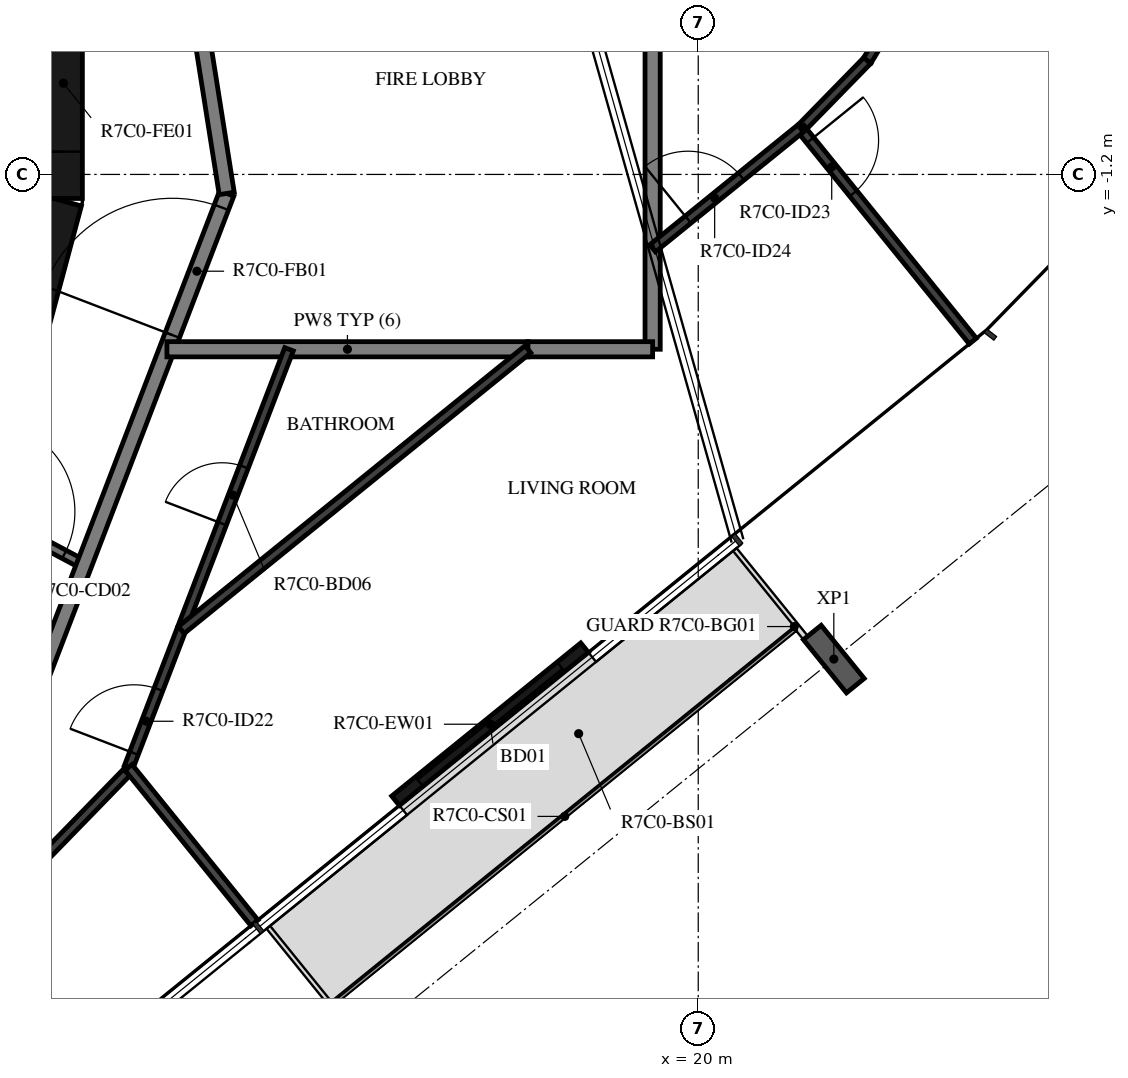
"""IFC4 building model, lengths in metres.
Left out: names, types, materials, properties, quantities, classifications, styles, units other than length and angle.
Written with IfcOpenShell. Run it as: python <this file> out.ifc"""

import sys

from ifc_helpers import new_model, si_unit, direction, frame, frame_2d, origin, origin_2d, place, context, subcontext, project, spatial, rectangle, i_section, extrude, element, fill, save


model = new_model("IFC4")
c1 = context("Model", 3, precision=1e-05, world=origin(), true_north=direction((0.0, 1.0)))
c2 = subcontext(c1, "Body", "Model", "MODEL_VIEW")
j1 = project(units=[si_unit("LENGTHUNIT", "METRE"), si_unit("PLANEANGLEUNIT", "RADIAN")], contexts=[c1])
p1 = place(None, origin())
s1 = spatial("IfcSite", under=j1, at=p1, CompositionType="ELEMENT")
p2 = place(p1, origin())
s2 = spatial("IfcBuilding", under=s1, at=p2, CompositionType="ELEMENT")
p3 = place(p2, frame((0.0, 0.0, 284.4)))
s3 = spatial("IfcBuildingStorey", under=s2, at=p3, CompositionType="ELEMENT", Elevation=284.4)
p4 = place(p3, frame((21.784, -7.576, -0.38), z_axis=(0.0, 0.0, 1.0), x_axis=(-0.777146167973, -0.629320136024, 0.0)))
e1 = element("IfcColumn", 1, at=p4, inside=s3, PredefinedType="COLUMN", context=c2, shape_type="SweptSolid", body=[
    extrude(i_section(OverallWidth=0.3, OverallDepth=0.9, WebThickness=0.019, FlangeThickness=0.035, FilletRadius=0.03, at=origin_2d()), origin(), (0.0, 0.0, 1.0), 3.5),
])
p5 = place(p3, frame((16.018, -9.44, 0.0), z_axis=(0.0, 0.0, 1.0), x_axis=(0.777125818, 0.629345265333, 0.0)))
e2 = element("IfcWall", 2, at=p5, inside=s3, PredefinedType="STANDARD", context=c2, shape_type="SweptSolid", body=[
    extrude(rectangle(XDim=3.2, YDim=0.16, at=frame_2d((1.6, 0.0))), origin(), (0.0, 0.0, 1.0), 3.12),
])
p6 = place(p5, frame((0.4, 0.0, 0.0)))
e3 = element("IfcOpeningElement", 3, at=p6, cuts=e2, PredefinedType="OPENING", context=c2, shape_type="SweptSolid", body=[
    extrude(rectangle(XDim=2.4, YDim=2.4, at=frame_2d((1.2, 1.2))), frame((0.0, 0.09, 0.0), z_axis=(0.0, -1.0, 0.0), x_axis=(1.0, 0.0, 0.0)), (0.0, 0.0, 1.0), 0.18),
])
p7 = place(p3, frame((10.858, -4.479, 0.0), z_axis=(0.0, 0.0, 1.0), x_axis=(0.258734743916, 0.965948410781, 0.0)))
e4 = element("IfcWall", 4, at=p7, inside=s3, PredefinedType="SHEAR", context=c2, shape_type="SweptSolid", body=[
    extrude(rectangle(XDim=3.033, YDim=0.5, at=frame_2d((1.516, 0.0))), origin(), (0.0, 0.0, 1.0), 3.12),
])
p8 = place(p3, frame((11.647, -1.516, 0.0), z_axis=(0.0, 0.0, 1.0), x_axis=(0.0, 1.0, 0.0)))
e5 = element("IfcWall", 5, at=p8, inside=s3, PredefinedType="SHEAR", context=c2, shape_type="SweptSolid", body=[
    extrude(rectangle(XDim=3.033, YDim=0.5, at=frame_2d((1.516, 0.0))), origin(), (0.0, 0.0, 1.0), 3.12),
])
p9 = place(p8, frame((0.616, 0.0, 0.0)))
e6 = element("IfcOpeningElement", 6, at=p9, cuts=e5, PredefinedType="OPENING", context=c2, shape_type="SweptSolid", body=[
    extrude(rectangle(XDim=1.8, YDim=2.1, at=frame_2d((0.9, 1.05))), frame((0.0, 0.26, 0.0), z_axis=(0.0, -1.0, 0.0), x_axis=(1.0, 0.0, 0.0)), (0.0, 0.0, 1.0), 0.52),
])
p10 = place(p3, frame((10.511, -5.589, 0.0), z_axis=(0.0, 0.0, 1.0), x_axis=(0.882983002821, -0.469404960273, 0.0)))
e7 = element("IfcWall", 7, at=p10, inside=s3, PredefinedType="PARTITIONING", context=c2, shape_type="SweptSolid", body=[
    extrude(rectangle(XDim=1.596, YDim=0.12, at=frame_2d((0.798, 0.0))), origin(), (0.0, 0.0, 1.0), 3.12),
])
p11 = place(p10, frame((0.1, 0.0, 0.0)))
e8 = element("IfcOpeningElement", 8, at=p11, cuts=e7, PredefinedType="OPENING", context=c2, shape_type="SweptSolid", body=[
    extrude(rectangle(XDim=1.2, YDim=2.1, at=frame_2d((0.6, 1.05))), frame((0.0, 0.07, 0.0), z_axis=(0.0, -1.0, 0.0), x_axis=(1.0, 0.0, 0.0)), (0.0, 0.0, 1.0), 0.14),
])
p12 = place(p3, frame((11.223, -8.154, 0.0), z_axis=(0.0, 0.0, 1.0), x_axis=(0.358341090983, 0.93359073609, 0.0)))
e9 = element("IfcWall", 9, at=p12, inside=s3, PredefinedType="STANDARD", context=c2, shape_type="SweptSolid", body=[
    extrude(rectangle(XDim=7.181, YDim=0.2, at=frame_2d((3.59, 0.0))), origin(), (0.0, 0.0, 1.0), 3.12),
])
p13 = place(p12, frame((5.185, 0.0, 0.0)))
e10 = element("IfcOpeningElement", 10, at=p13, cuts=e9, PredefinedType="OPENING", context=c2, shape_type="SweptSolid", body=[
    extrude(rectangle(XDim=1.8, YDim=2.1, at=frame_2d((0.9, 1.05))), frame((0.0, 0.11, 0.0), z_axis=(0.0, -1.0, 0.0), x_axis=(1.0, 0.0, 0.0)), (0.0, 0.0, 1.0), 0.22),
])
p14 = place(p3, frame((13.797, -1.45, 0.0), z_axis=(0.0, 0.0, 1.0), x_axis=(-0.156421704315, 0.987690361611, 0.0)))
e11 = element("IfcWall", 11, at=p14, inside=s3, PredefinedType="STANDARD", context=c2, shape_type="SweptSolid", body=[
    extrude(rectangle(XDim=7.181, YDim=0.2, at=frame_2d((3.591, 0.0))), origin(), (0.0, 0.0, 1.0), 3.12),
])
p15 = place(p3, frame((13.01, -3.5, 0.0), z_axis=(0.0, 0.0, 1.0), x_axis=(1.0, 0.0, 0.0)))
e12 = element("IfcWall", 12, at=p15, inside=s3, PredefinedType="STANDARD", context=c2, shape_type="SweptSolid", body=[
    extrude(rectangle(XDim=4.75, YDim=0.2, at=frame_2d((2.375, 0.0))), origin(), (0.0, 0.0, 1.0), 3.12),
])
p16 = place(p3, frame((19.4, -3.5, 0.0), z_axis=(0.0, 0.0, 1.0), x_axis=(0.0, 1.0, 0.0)))
e13 = element("IfcWall", 13, at=p16, inside=s3, PredefinedType="STANDARD", context=c2, shape_type="SweptSolid", body=[
    extrude(rectangle(XDim=5.021, YDim=0.2, at=frame_2d((2.511, 0.0))), origin(), (0.0, 0.0, 1.0), 3.12),
])
p17 = place(p3, frame((17.76, -3.5, 0.0), z_axis=(0.0, 0.0, 1.0), x_axis=(1.0, 0.0, 0.0)))
e14 = element("IfcWall", 14, at=p17, inside=s3, PredefinedType="STANDARD", context=c2, shape_type="SweptSolid", body=[
    extrude(rectangle(XDim=1.64, YDim=0.2, at=frame_2d((0.82, 0.0))), origin(), (0.0, 0.0, 1.0), 3.12),
])
p18 = place(p3, frame((7.007, -14.692, 0.0), z_axis=(0.0, 0.0, 1.0), x_axis=(0.697286714348, 0.716792325568, 0.0)))
e15 = element("IfcWall", 15, at=p18, inside=s3, PredefinedType="PARTITIONING", context=c2, shape_type="SweptSolid", body=[
    extrude(rectangle(XDim=7.848, YDim=0.12, at=frame_2d((3.924, 0.0))), origin(), (0.0, 0.0, 1.0), 3.12),
])
p19 = place(p18, frame((0.2, 0.0, 0.0)))
e16 = element("IfcOpeningElement", 16, at=p19, cuts=e15, PredefinedType="OPENING", context=c2, shape_type="SweptSolid", body=[
    extrude(rectangle(XDim=0.9, YDim=2.1, at=frame_2d((0.45, 1.05))), frame((0.0, 0.07, 0.0), z_axis=(0.0, -1.0, 0.0), x_axis=(1.0, 0.0, 0.0)), (0.0, 0.0, 1.0), 0.14),
])
p20 = place(p3, frame((12.505, -9.001, 0.0), z_axis=(0.0, 0.0, 1.0), x_axis=(0.358373707046, 0.933578216379, 0.0)))
e17 = element("IfcWall", 17, at=p20, inside=s3, PredefinedType="PARTITIONING", context=c2, shape_type="SweptSolid", body=[
    extrude(rectangle(XDim=5.892, YDim=0.12, at=frame_2d((2.946, 0.0))), origin(), (0.0, 0.0, 1.0), 3.12),
])
p21 = place(p20, frame((0.2, 0.0, 0.0)))
e18 = element("IfcOpeningElement", 18, at=p21, cuts=e17, PredefinedType="OPENING", context=c2, shape_type="SweptSolid", body=[
    extrude(rectangle(XDim=0.9, YDim=2.1, at=frame_2d((0.45, 1.05))), frame((0.0, 0.07, 0.0), z_axis=(0.0, -1.0, 0.0), x_axis=(1.0, 0.0, 0.0)), (0.0, 0.0, 1.0), 0.14),
])
p22 = place(p20, frame((3.436, 0.0, 0.0)))
e19 = element("IfcOpeningElement", 19, at=p22, cuts=e17, PredefinedType="OPENING", context=c2, shape_type="SweptSolid", body=[
    extrude(rectangle(XDim=0.8, YDim=2.1, at=frame_2d((0.4, 1.05))), frame((0.0, 0.07, 0.0), z_axis=(0.0, -1.0, 0.0), x_axis=(1.0, 0.0, 0.0)), (0.0, 0.0, 1.0), 0.14),
])
p23 = place(p3, frame((22.746, 1.168, 0.0), z_axis=(0.0, 0.0, 1.0), x_axis=(-0.515096534995, -0.857132171626, 0.0)))
e20 = element("IfcWall", 20, at=p23, inside=s3, PredefinedType="PARTITIONING", context=c2, shape_type="SweptSolid", body=[
    extrude(rectangle(XDim=1.016, YDim=0.12, at=frame_2d((0.508, 0.0))), origin(), (0.0, 0.0, 1.0), 3.12),
])
p24 = place(p3, frame((22.223, 0.298, 0.0), z_axis=(0.0, 0.0, 1.0), x_axis=(-0.69880109182, -0.715316037896, 0.0)))
e21 = element("IfcWall", 21, at=p24, inside=s3, PredefinedType="PARTITIONING", context=c2, shape_type="SweptSolid", body=[
    extrude(rectangle(XDim=1.227, YDim=0.12, at=frame_2d((0.614, 0.0))), origin(), (0.0, 0.0, 1.0), 3.12),
])
p25 = place(p3, frame((21.347, -0.595, 0.0), z_axis=(0.0, 0.0, 1.0), x_axis=(0.62934843781, -0.7771232488, 0.0)))
e22 = element("IfcWall", 22, at=p25, inside=s3, PredefinedType="PARTITIONING", context=c2, shape_type="SweptSolid", body=[
    extrude(rectangle(XDim=3.6, YDim=0.12, at=frame_2d((1.8, 0.0))), origin(), (0.0, 0.0, 1.0), 3.12),
])
p26 = place(p25, frame((0.2, 0.0, 0.0)))
e23 = element("IfcOpeningElement", 23, at=p26, cuts=e22, PredefinedType="OPENING", context=c2, shape_type="SweptSolid", body=[
    extrude(rectangle(XDim=0.9, YDim=2.1, at=frame_2d((0.45, 1.05))), frame((0.0, 0.07, 0.0), z_axis=(0.0, -1.0, 0.0), x_axis=(1.0, 0.0, 0.0)), (0.0, 0.0, 1.0), 0.14),
])
p27 = place(p3, frame((19.4, -2.172, 0.0), z_axis=(0.0, 0.0, 1.0), x_axis=(0.777147279935, 0.629318762862, 0.0)))
e24 = element("IfcWall", 24, at=p27, inside=s3, PredefinedType="PARTITIONING", context=c2, shape_type="SweptSolid", body=[
    extrude(rectangle(XDim=2.505, YDim=0.12, at=frame_2d((1.253, 0.0))), origin(), (0.0, 0.0, 1.0), 3.12),
])
p28 = place(p27, frame((0.6, 0.0, 0.0)))
e25 = element("IfcOpeningElement", 25, at=p28, cuts=e24, PredefinedType="OPENING", context=c2, shape_type="SweptSolid", body=[
    extrude(rectangle(XDim=0.9, YDim=2.1, at=frame_2d((0.45, 1.05))), frame((0.0, 0.07, 0.0), z_axis=(0.0, -1.0, 0.0), x_axis=(1.0, 0.0, 0.0)), (0.0, 0.0, 1.0), 0.14),
])
p29 = place(p3, frame((14.161, -11.046, 0.0), z_axis=(0.0, 0.0, 1.0), x_axis=(-0.62931028473, 0.777154145284, 0.0)))
e26 = element("IfcWall", 26, at=p29, inside=s3, PredefinedType="PARTITIONING", context=c2, shape_type="SweptSolid", body=[
    extrude(rectangle(XDim=2.632, YDim=0.12, at=frame_2d((1.316, 0.0))), origin(), (0.0, 0.0, 1.0), 2.73),
])
p30 = place(p3, frame((17.76, -3.5, 0.0), z_axis=(0.0, 0.0, 1.0), x_axis=(-0.777133455716, -0.62933583404, 0.0)))
e27 = element("IfcWall", 27, at=p30, inside=s3, PredefinedType="PARTITIONING", context=c2, shape_type="SweptSolid", body=[
    extrude(rectangle(XDim=5.869, YDim=0.12, at=frame_2d((2.935, 0.0))), origin(), (0.0, 0.0, 1.0), 3.12),
])
p31 = place(p6, origin())
e28 = element("IfcDoor", 28, at=p31, inside=s3, OperationType="DOUBLE_DOOR_SLIDING", PredefinedType="DOOR", context=c2, shape_type="SweptSolid", body=[
    extrude(rectangle(XDim=2.4, YDim=2.4, at=frame_2d((1.2, 1.2))), frame((0.0, 0.025, 0.0), z_axis=(0.0, -1.0, 0.0), x_axis=(1.0, 0.0, 0.0)), (0.0, 0.0, 1.0), 0.05),
])
fill(e3, e28)
p32 = place(p9, origin())
e29 = element("IfcDoor", 29, at=p32, inside=s3, OperationType="DOUBLE_DOOR_SINGLE_SWING", PredefinedType="DOOR", context=c2, shape_type="SweptSolid", body=[
    extrude(rectangle(XDim=1.8, YDim=2.1, at=frame_2d((0.9, 1.05))), frame((0.0, 0.025, 0.0), z_axis=(0.0, -1.0, 0.0), x_axis=(1.0, 0.0, 0.0)), (0.0, 0.0, 1.0), 0.05),
])
fill(e6, e29)
p33 = place(p21, origin())
e30 = element("IfcDoor", 30, at=p33, inside=s3, OperationType="SINGLE_SWING_RIGHT", PredefinedType="DOOR", context=c2, shape_type="SweptSolid", body=[
    extrude(rectangle(XDim=0.9, YDim=2.1, at=frame_2d((0.45, 1.05))), frame((0.0, 0.025, 0.0), z_axis=(0.0, -1.0, 0.0), x_axis=(1.0, 0.0, 0.0)), (0.0, 0.0, 1.0), 0.05),
])
fill(e18, e30)
p34 = place(p22, origin())
e31 = element("IfcDoor", 31, at=p34, inside=s3, OperationType="SINGLE_SWING_RIGHT", PredefinedType="DOOR", context=c2, shape_type="SweptSolid", body=[
    extrude(rectangle(XDim=0.8, YDim=2.1, at=frame_2d((0.4, 1.05))), frame((0.0, 0.025, 0.0), z_axis=(0.0, -1.0, 0.0), x_axis=(1.0, 0.0, 0.0)), (0.0, 0.0, 1.0), 0.05),
])
fill(e19, e31)
p35 = place(p26, origin())
e32 = element("IfcDoor", 32, at=p35, inside=s3, OperationType="SINGLE_SWING_RIGHT", PredefinedType="DOOR", context=c2, shape_type="SweptSolid", body=[
    extrude(rectangle(XDim=0.9, YDim=2.1, at=frame_2d((0.45, 1.05))), frame((0.0, 0.025, 0.0), z_axis=(0.0, -1.0, 0.0), x_axis=(1.0, 0.0, 0.0)), (0.0, 0.0, 1.0), 0.05),
])
fill(e23, e32)
p36 = place(p28, origin())
e33 = element("IfcDoor", 33, at=p36, inside=s3, OperationType="SINGLE_SWING_LEFT", PredefinedType="DOOR", context=c2, shape_type="SweptSolid", body=[
    extrude(rectangle(XDim=0.9, YDim=2.1, at=frame_2d((0.45, 1.05))), frame((0.0, 0.025, 0.0), z_axis=(0.0, -1.0, 0.0), x_axis=(1.0, 0.0, 0.0)), (0.0, 0.0, 1.0), 0.05),
])
fill(e25, e33)
p37 = place(p11, origin())
e34 = element("IfcDoor", 34, at=p37, inside=s3, OperationType="DOUBLE_DOOR_SINGLE_SWING", PredefinedType="DOOR", context=c2, shape_type="SweptSolid", body=[
    extrude(rectangle(XDim=1.2, YDim=2.1, at=frame_2d((0.6, 1.05))), frame((0.0, 0.025, 0.0), z_axis=(0.0, -1.0, 0.0), x_axis=(1.0, 0.0, 0.0)), (0.0, 0.0, 1.0), 0.05),
])
fill(e8, e34)
p38 = place(p13, origin())
e35 = element("IfcDoor", 35, at=p38, inside=s3, OperationType="DOUBLE_DOOR_SINGLE_SWING", PredefinedType="DOOR", context=c2, shape_type="SweptSolid", body=[
    extrude(rectangle(XDim=1.8, YDim=2.1, at=frame_2d((0.9, 1.05))), frame((0.0, 0.025, 0.0), z_axis=(0.0, -1.0, 0.0), x_axis=(1.0, 0.0, 0.0)), (0.0, 0.0, 1.0), 0.05),
])
fill(e10, e35)
save(model, sys.argv[1])
